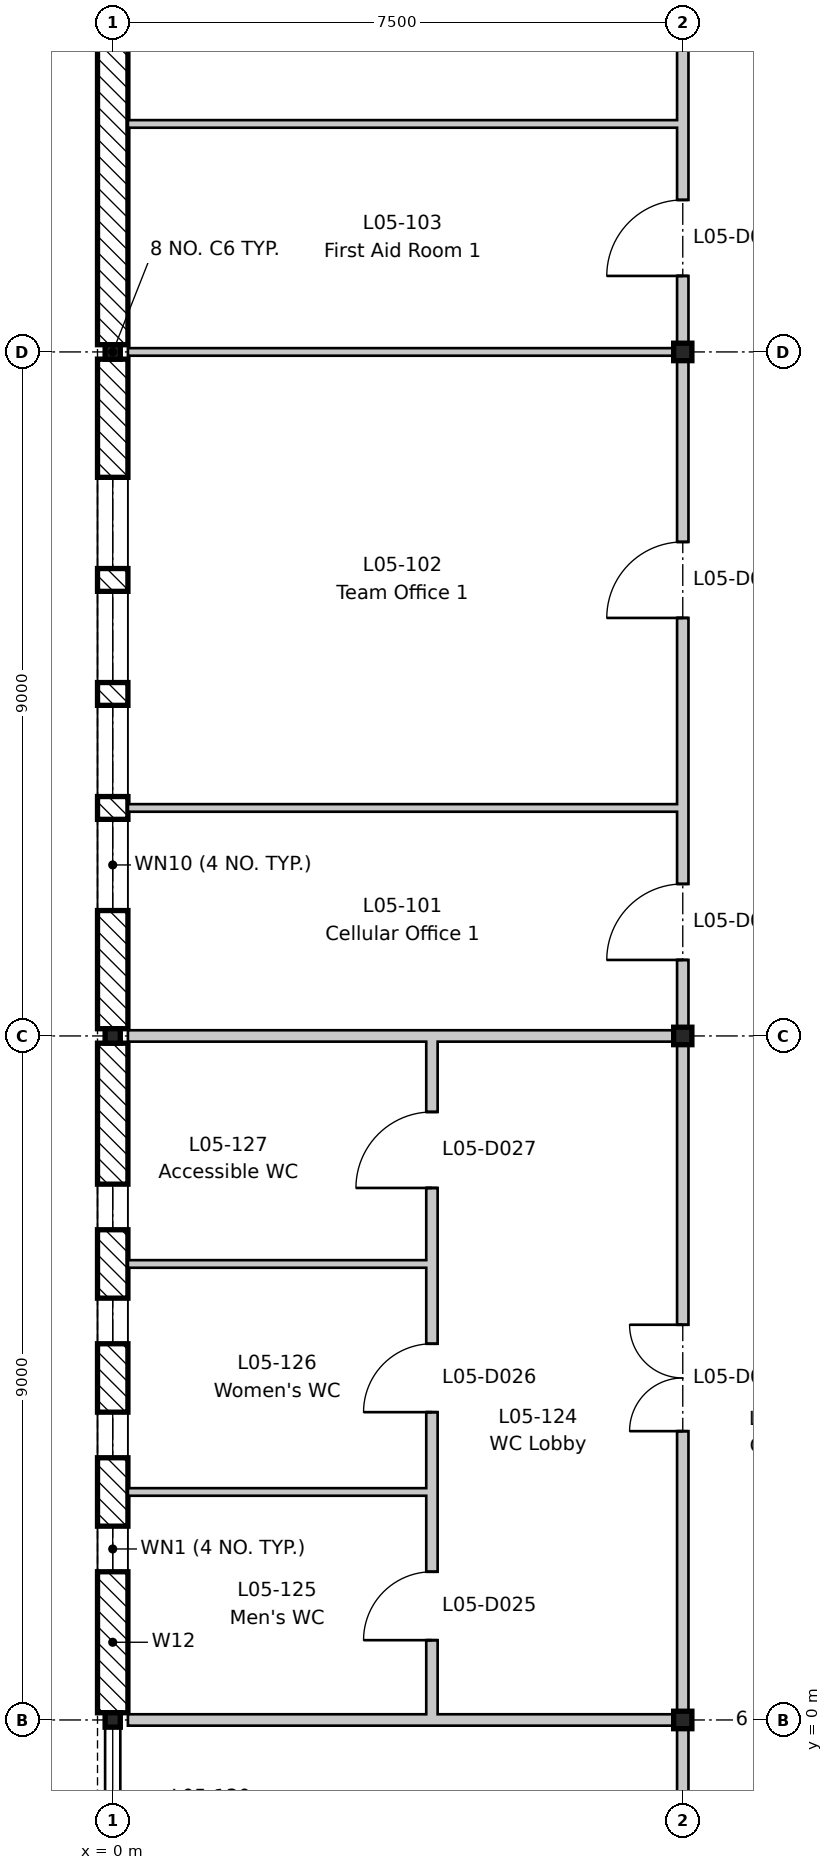
"""IFC4 building model, lengths in metres.
Left out: names, types, materials, properties, quantities, classifications, styles, units other than length and angle.
Written with IfcOpenShell. Run it as: python <this file> out.ifc"""

import sys

from ifc_helpers import new_model, si_unit, direction, frame, frame_2d, origin, origin_2d, place, context, subcontext, project, spatial, rectangle, i_section, extrude, element, fill, save


model = new_model("IFC4")
c1 = context("Model", 3, precision=1e-05, world=origin(), true_north=direction((0.0, 1.0)))
c2 = subcontext(c1, "Body", "Model", "MODEL_VIEW")
j1 = project(units=[si_unit("LENGTHUNIT", "METRE"), si_unit("PLANEANGLEUNIT", "RADIAN")], contexts=[c1])
p1 = place(None, origin())
s1 = spatial("IfcSite", under=j1, at=p1, CompositionType="ELEMENT")
p2 = place(p1, origin())
s2 = spatial("IfcBuilding", under=s1, at=p2, CompositionType="ELEMENT")
p3 = place(p2, frame((0.0, 0.0, 22.8)))
s3 = spatial("IfcBuildingStorey", under=s2, at=p3, CompositionType="ELEMENT", Elevation=22.8)
for number, where, z_axis, x_axis in (
    (1, (0.0, 0.0, -0.2), (0.0, 0.0, 1.0), (1.0, 0.0, 0.0)),
    (2, (0.0, 9.0, -0.2), (0.0, 0.0, 1.0), (1.0, 0.0, 0.0)),
    (3, (0.0, 18.0, -0.2), (0.0, 0.0, 1.0), (1.0, 0.0, 0.0)),
):
    element("IfcColumn", number, at=place(p3, frame(where, z_axis=z_axis, x_axis=x_axis)), inside=s3, PredefinedType="COLUMN", context=c2, shape_type="SweptSolid", body=[
        extrude(i_section(OverallWidth=0.2, OverallDepth=0.19, WebThickness=0.007, FlangeThickness=0.01, FilletRadius=0.018, at=origin_2d()), origin(), (0.0, 0.0, 1.0), 4.15),
    ])
for number, where, z_axis, x_axis in (
    (4, (7.5, 0.0, -0.2), (0.0, 0.0, 1.0), (1.0, 0.0, 0.0)),
    (5, (7.5, 9.0, -0.2), (0.0, 0.0, 1.0), (1.0, 0.0, 0.0)),
    (6, (7.5, 18.0, -0.2), (0.0, 0.0, 1.0), (1.0, 0.0, 0.0)),
):
    element("IfcColumn", number, at=place(p3, frame(where, z_axis=z_axis, x_axis=x_axis)), inside=s3, PredefinedType="COLUMN", context=c2, shape_type="SweptSolid", body=[
        extrude(i_section(OverallWidth=0.24, OverallDepth=0.23, WebThickness=0.008, FlangeThickness=0.012, FilletRadius=0.021, at=origin_2d()), origin(), (0.0, 0.0, 1.0), 4.15),
    ])
p4 = place(p3, frame((0.0, 0.095, 0.0), z_axis=(0.0, 0.0, 1.0), x_axis=(0.0, 1.0, 0.0)))
e7 = element("IfcWall", 7, at=p4, inside=s3, PredefinedType="STANDARD", context=c2, shape_type="SweptSolid", body=[
    extrude(rectangle(XDim=8.81, YDim=0.4, at=frame_2d((4.405, 0.0))), origin(), (0.0, 0.0, 1.0), 3.55),
])
p5 = place(p4, frame((1.855, 0.0, 1.5)))
e8 = element("IfcOpeningElement", 8, at=p5, cuts=e7, PredefinedType="OPENING", context=c2, shape_type="SweptSolid", body=[
    extrude(rectangle(XDim=0.6, YDim=1.2, at=frame_2d((0.3, 0.6))), frame((0.0, 0.21, 0.0), z_axis=(0.0, -1.0, 0.0), x_axis=(1.0, 0.0, 0.0)), (0.0, 0.0, 1.0), 0.42),
])
p6 = place(p4, frame((3.355, 0.0, 1.5)))
e9 = element("IfcOpeningElement", 9, at=p6, cuts=e7, PredefinedType="OPENING", context=c2, shape_type="SweptSolid", body=[
    extrude(rectangle(XDim=0.6, YDim=1.2, at=frame_2d((0.3, 0.6))), frame((0.0, 0.21, 0.0), z_axis=(0.0, -1.0, 0.0), x_axis=(1.0, 0.0, 0.0)), (0.0, 0.0, 1.0), 0.42),
])
p7 = place(p4, frame((4.855, 0.0, 1.5)))
e10 = element("IfcOpeningElement", 10, at=p7, cuts=e7, PredefinedType="OPENING", context=c2, shape_type="SweptSolid", body=[
    extrude(rectangle(XDim=0.6, YDim=1.2, at=frame_2d((0.3, 0.6))), frame((0.0, 0.21, 0.0), z_axis=(0.0, -1.0, 0.0), x_axis=(1.0, 0.0, 0.0)), (0.0, 0.0, 1.0), 0.42),
])
p8 = place(p4, frame((6.355, 0.0, 1.5)))
e11 = element("IfcOpeningElement", 11, at=p8, cuts=e7, PredefinedType="OPENING", context=c2, shape_type="SweptSolid", body=[
    extrude(rectangle(XDim=0.6, YDim=1.2, at=frame_2d((0.3, 0.6))), frame((0.0, 0.21, 0.0), z_axis=(0.0, -1.0, 0.0), x_axis=(1.0, 0.0, 0.0)), (0.0, 0.0, 1.0), 0.42),
])
p9 = place(p3, frame((0.0, 9.095, 0.0), z_axis=(0.0, 0.0, 1.0), x_axis=(0.0, 1.0, 0.0)))
e12 = element("IfcWall", 12, at=p9, inside=s3, PredefinedType="STANDARD", context=c2, shape_type="SweptSolid", body=[
    extrude(rectangle(XDim=8.81, YDim=0.4, at=frame_2d((4.405, 0.0))), origin(), (0.0, 0.0, 1.0), 3.55),
])
p10 = place(p9, frame((1.555, 0.0, 0.6)))
e13 = element("IfcOpeningElement", 13, at=p10, cuts=e12, PredefinedType="OPENING", context=c2, shape_type="SweptSolid", body=[
    extrude(rectangle(XDim=1.2, YDim=1.8, at=frame_2d((0.6, 0.9))), frame((0.0, 0.21, 0.0), z_axis=(0.0, -1.0, 0.0), x_axis=(1.0, 0.0, 0.0)), (0.0, 0.0, 1.0), 0.42),
])
p11 = place(p9, frame((3.055, 0.0, 0.6)))
e14 = element("IfcOpeningElement", 14, at=p11, cuts=e12, PredefinedType="OPENING", context=c2, shape_type="SweptSolid", body=[
    extrude(rectangle(XDim=1.2, YDim=1.8, at=frame_2d((0.6, 0.9))), frame((0.0, 0.21, 0.0), z_axis=(0.0, -1.0, 0.0), x_axis=(1.0, 0.0, 0.0)), (0.0, 0.0, 1.0), 0.42),
])
p12 = place(p9, frame((4.555, 0.0, 0.6)))
e15 = element("IfcOpeningElement", 15, at=p12, cuts=e12, PredefinedType="OPENING", context=c2, shape_type="SweptSolid", body=[
    extrude(rectangle(XDim=1.2, YDim=1.8, at=frame_2d((0.6, 0.9))), frame((0.0, 0.21, 0.0), z_axis=(0.0, -1.0, 0.0), x_axis=(1.0, 0.0, 0.0)), (0.0, 0.0, 1.0), 0.42),
])
p13 = place(p9, frame((6.055, 0.0, 0.6)))
e16 = element("IfcOpeningElement", 16, at=p13, cuts=e12, PredefinedType="OPENING", context=c2, shape_type="SweptSolid", body=[
    extrude(rectangle(XDim=1.2, YDim=1.8, at=frame_2d((0.6, 0.9))), frame((0.0, 0.21, 0.0), z_axis=(0.0, -1.0, 0.0), x_axis=(1.0, 0.0, 0.0)), (0.0, 0.0, 1.0), 0.42),
])
p14 = place(p3, frame((0.0, 18.095, 0.0), z_axis=(0.0, 0.0, 1.0), x_axis=(0.0, 1.0, 0.0)))
e17 = element("IfcWall", 17, at=p14, inside=s3, PredefinedType="STANDARD", context=c2, shape_type="SweptSolid", body=[
    extrude(rectangle(XDim=8.81, YDim=0.4, at=frame_2d((4.405, 0.0))), origin(), (0.0, 0.0, 1.0), 3.55),
])
p15 = place(p3, frame((0.2, 9.0, 0.0), z_axis=(0.0, 0.0, 1.0), x_axis=(1.0, 0.0, 0.0)))
e18 = element("IfcWall", 18, at=p15, inside=s3, PredefinedType="PARTITIONING", context=c2, shape_type="SweptSolid", body=[
    extrude(rectangle(XDim=7.225, YDim=0.15, at=frame_2d((3.613, 0.0))), origin(), (0.0, 0.0, 1.0), 3.6),
])
p16 = place(p3, frame((0.2, 12.0, 0.0), z_axis=(0.0, 0.0, 1.0), x_axis=(1.0, 0.0, 0.0)))
e19 = element("IfcWall", 19, at=p16, inside=s3, PredefinedType="PARTITIONING", context=c2, shape_type="SweptSolid", body=[
    extrude(rectangle(XDim=7.225, YDim=0.1, at=frame_2d((3.613, 0.0))), origin(), (0.0, 0.0, 1.0), 3.95),
])
p17 = place(p3, frame((0.2, 18.0, 0.0), z_axis=(0.0, 0.0, 1.0), x_axis=(1.0, 0.0, 0.0)))
e20 = element("IfcWall", 20, at=p17, inside=s3, PredefinedType="PARTITIONING", context=c2, shape_type="SweptSolid", body=[
    extrude(rectangle(XDim=7.225, YDim=0.1, at=frame_2d((3.613, 0.0))), origin(), (0.0, 0.0, 1.0), 3.6),
])
p18 = place(p3, frame((0.2, 21.0, 0.0), z_axis=(0.0, 0.0, 1.0), x_axis=(1.0, 0.0, 0.0)))
e21 = element("IfcWall", 21, at=p18, inside=s3, PredefinedType="PARTITIONING", context=c2, shape_type="SweptSolid", body=[
    extrude(rectangle(XDim=7.225, YDim=0.1, at=frame_2d((3.613, 0.0))), origin(), (0.0, 0.0, 1.0), 3.95),
])
p19 = place(p3, frame((0.2, 0.0, 0.0), z_axis=(0.0, 0.0, 1.0), x_axis=(1.0, 0.0, 0.0)))
e22 = element("IfcWall", 22, at=p19, inside=s3, PredefinedType="PARTITIONING", context=c2, shape_type="SweptSolid", body=[
    extrude(rectangle(XDim=7.225, YDim=0.15, at=frame_2d((3.613, 0.0))), origin(), (0.0, 0.0, 1.0), 3.6),
])
p20 = place(p3, frame((7.5, -8.8, 0.0), z_axis=(0.0, 0.0, 1.0), x_axis=(0.0, 1.0, 0.0)))
e23 = element("IfcWall", 23, at=p20, inside=s3, PredefinedType="PARTITIONING", context=c2, shape_type="SweptSolid", body=[
    extrude(rectangle(XDim=79.3, YDim=0.15, at=frame_2d((39.65, 0.0))), origin(), (0.0, 0.0, 1.0), 3.43),
])
p21 = place(p20, frame((18.8, 0.0, 0.0)))
e24 = element("IfcOpeningElement", 24, at=p21, cuts=e23, PredefinedType="OPENING", context=c2, shape_type="SweptSolid", body=[
    extrude(rectangle(XDim=1.0, YDim=2.1, at=frame_2d((0.5, 1.05))), frame((0.0, 0.085, 0.0), z_axis=(0.0, -1.0, 0.0), x_axis=(1.0, 0.0, 0.0)), (0.0, 0.0, 1.0), 0.17),
])
p22 = place(p20, frame((23.3, 0.0, 0.0)))
e25 = element("IfcOpeningElement", 25, at=p22, cuts=e23, PredefinedType="OPENING", context=c2, shape_type="SweptSolid", body=[
    extrude(rectangle(XDim=1.0, YDim=2.1, at=frame_2d((0.5, 1.05))), frame((0.0, 0.085, 0.0), z_axis=(0.0, -1.0, 0.0), x_axis=(1.0, 0.0, 0.0)), (0.0, 0.0, 1.0), 0.17),
])
p23 = place(p20, frame((27.8, 0.0, 0.0)))
e26 = element("IfcOpeningElement", 26, at=p23, cuts=e23, PredefinedType="OPENING", context=c2, shape_type="SweptSolid", body=[
    extrude(rectangle(XDim=1.0, YDim=2.1, at=frame_2d((0.5, 1.05))), frame((0.0, 0.085, 0.0), z_axis=(0.0, -1.0, 0.0), x_axis=(1.0, 0.0, 0.0)), (0.0, 0.0, 1.0), 0.17),
])
p24 = place(p20, frame((32.3, 0.0, 0.0)))
e27 = element("IfcOpeningElement", 27, at=p24, cuts=e23, PredefinedType="OPENING", context=c2, shape_type="SweptSolid", body=[
    extrude(rectangle(XDim=1.0, YDim=2.1, at=frame_2d((0.5, 1.05))), frame((0.0, 0.085, 0.0), z_axis=(0.0, -1.0, 0.0), x_axis=(1.0, 0.0, 0.0)), (0.0, 0.0, 1.0), 0.17),
])
p25 = place(p20, frame((45.8, 0.0, 0.0)))
e28 = element("IfcOpeningElement", 28, at=p25, cuts=e23, PredefinedType="OPENING", context=c2, shape_type="SweptSolid", body=[
    extrude(rectangle(XDim=1.0, YDim=2.1, at=frame_2d((0.5, 1.05))), frame((0.0, 0.085, 0.0), z_axis=(0.0, -1.0, 0.0), x_axis=(1.0, 0.0, 0.0)), (0.0, 0.0, 1.0), 0.17),
])
p26 = place(p20, frame((48.8, 0.0, 0.0)))
e29 = element("IfcOpeningElement", 29, at=p26, cuts=e23, PredefinedType="OPENING", context=c2, shape_type="SweptSolid", body=[
    extrude(rectangle(XDim=1.0, YDim=2.1, at=frame_2d((0.5, 1.05))), frame((0.0, 0.085, 0.0), z_axis=(0.0, -1.0, 0.0), x_axis=(1.0, 0.0, 0.0)), (0.0, 0.0, 1.0), 0.17),
])
p27 = place(p20, frame((54.55, 0.0, 0.0)))
e30 = element("IfcOpeningElement", 30, at=p27, cuts=e23, PredefinedType="OPENING", context=c2, shape_type="SweptSolid", body=[
    extrude(rectangle(XDim=1.0, YDim=2.1, at=frame_2d((0.5, 1.05))), frame((0.0, 0.085, 0.0), z_axis=(0.0, -1.0, 0.0), x_axis=(1.0, 0.0, 0.0)), (0.0, 0.0, 1.0), 0.17),
])
p28 = place(p20, frame((57.8, 0.0, 0.0)))
e31 = element("IfcOpeningElement", 31, at=p28, cuts=e23, PredefinedType="OPENING", context=c2, shape_type="SweptSolid", body=[
    extrude(rectangle(XDim=1.0, YDim=2.1, at=frame_2d((0.5, 1.05))), frame((0.0, 0.085, 0.0), z_axis=(0.0, -1.0, 0.0), x_axis=(1.0, 0.0, 0.0)), (0.0, 0.0, 1.0), 0.17),
])
p29 = place(p20, frame((60.8, 0.0, 0.0)))
e32 = element("IfcOpeningElement", 32, at=p29, cuts=e23, PredefinedType="OPENING", context=c2, shape_type="SweptSolid", body=[
    extrude(rectangle(XDim=1.0, YDim=2.1, at=frame_2d((0.5, 1.05))), frame((0.0, 0.085, 0.0), z_axis=(0.0, -1.0, 0.0), x_axis=(1.0, 0.0, 0.0)), (0.0, 0.0, 1.0), 0.17),
])
p30 = place(p20, frame((12.6, 0.0, 0.0)))
e33 = element("IfcOpeningElement", 33, at=p30, cuts=e23, PredefinedType="OPENING", context=c2, shape_type="SweptSolid", body=[
    extrude(rectangle(XDim=1.4, YDim=2.1, at=frame_2d((0.7, 1.05))), frame((0.0, 0.085, 0.0), z_axis=(0.0, -1.0, 0.0), x_axis=(1.0, 0.0, 0.0)), (0.0, 0.0, 1.0), 0.17),
])
p31 = place(p20, frame((3.6, 0.0, 0.0)))
e34 = element("IfcOpeningElement", 34, at=p31, cuts=e23, PredefinedType="OPENING", context=c2, shape_type="SweptSolid", body=[
    extrude(rectangle(XDim=1.4, YDim=2.1, at=frame_2d((0.7, 1.05))), frame((0.0, 0.085, 0.0), z_axis=(0.0, -1.0, 0.0), x_axis=(1.0, 0.0, 0.0)), (0.0, 0.0, 1.0), 0.17),
])
p32 = place(p20, frame((63.55, 0.0, 0.0)))
e35 = element("IfcOpeningElement", 35, at=p32, cuts=e23, PredefinedType="OPENING", context=c2, shape_type="SweptSolid", body=[
    extrude(rectangle(XDim=1.4, YDim=2.1, at=frame_2d((0.7, 1.05))), frame((0.0, 0.085, 0.0), z_axis=(0.0, -1.0, 0.0), x_axis=(1.0, 0.0, 0.0)), (0.0, 0.0, 1.0), 0.17),
])
p33 = place(p20, frame((69.6, 0.0, 0.0)))
e36 = element("IfcOpeningElement", 36, at=p33, cuts=e23, PredefinedType="OPENING", context=c2, shape_type="SweptSolid", body=[
    extrude(rectangle(XDim=1.4, YDim=2.1, at=frame_2d((0.7, 1.05))), frame((0.0, 0.085, 0.0), z_axis=(0.0, -1.0, 0.0), x_axis=(1.0, 0.0, 0.0)), (0.0, 0.0, 1.0), 0.17),
])
p34 = place(p20, frame((42.85, 0.0, 0.0)))
e37 = element("IfcOpeningElement", 37, at=p34, cuts=e23, PredefinedType="OPENING", context=c2, shape_type="SweptSolid", body=[
    extrude(rectangle(XDim=1.0, YDim=2.1, at=frame_2d((0.5, 1.05))), frame((0.0, 0.085, 0.0), z_axis=(0.0, -1.0, 0.0), x_axis=(1.0, 0.0, 0.0)), (0.0, 0.0, 1.0), 0.17),
])
p35 = place(p20, frame((36.55, 0.0, 0.0)))
e38 = element("IfcOpeningElement", 38, at=p35, cuts=e23, PredefinedType="OPENING", context=c2, shape_type="SweptSolid", body=[
    extrude(rectangle(XDim=1.4, YDim=2.1, at=frame_2d((0.7, 1.05))), frame((0.0, 0.085, 0.0), z_axis=(0.0, -1.0, 0.0), x_axis=(1.0, 0.0, 0.0)), (0.0, 0.0, 1.0), 0.17),
])
p36 = place(p20, frame((72.8, 0.0, 0.0)))
e39 = element("IfcOpeningElement", 39, at=p36, cuts=e23, PredefinedType="OPENING", context=c2, shape_type="SweptSolid", body=[
    extrude(rectangle(XDim=1.0, YDim=2.1, at=frame_2d((0.5, 1.05))), frame((0.0, 0.085, 0.0), z_axis=(0.0, -1.0, 0.0), x_axis=(1.0, 0.0, 0.0)), (0.0, 0.0, 1.0), 0.17),
])
p37 = place(p3, frame((4.2, 0.075, 0.0), z_axis=(0.0, 0.0, 1.0), x_axis=(0.0, 1.0, 0.0)))
e40 = element("IfcWall", 40, at=p37, inside=s3, PredefinedType="PARTITIONING", context=c2, shape_type="SweptSolid", body=[
    extrude(rectangle(XDim=8.85, YDim=0.15, at=frame_2d((4.425, 0.0))), origin(), (0.0, 0.0, 1.0), 3.95),
])
p38 = place(p37, frame((0.975, 0.0, 0.0)))
e41 = element("IfcOpeningElement", 41, at=p38, cuts=e40, PredefinedType="OPENING", context=c2, shape_type="SweptSolid", body=[
    extrude(rectangle(XDim=0.9, YDim=2.1, at=frame_2d((0.45, 1.05))), frame((0.0, 0.085, 0.0), z_axis=(0.0, -1.0, 0.0), x_axis=(1.0, 0.0, 0.0)), (0.0, 0.0, 1.0), 0.17),
])
p39 = place(p37, frame((3.975, 0.0, 0.0)))
e42 = element("IfcOpeningElement", 42, at=p39, cuts=e40, PredefinedType="OPENING", context=c2, shape_type="SweptSolid", body=[
    extrude(rectangle(XDim=0.9, YDim=2.1, at=frame_2d((0.45, 1.05))), frame((0.0, 0.085, 0.0), z_axis=(0.0, -1.0, 0.0), x_axis=(1.0, 0.0, 0.0)), (0.0, 0.0, 1.0), 0.17),
])
p40 = place(p37, frame((6.925, 0.0, 0.0)))
e43 = element("IfcOpeningElement", 43, at=p40, cuts=e40, PredefinedType="OPENING", context=c2, shape_type="SweptSolid", body=[
    extrude(rectangle(XDim=1.0, YDim=2.1, at=frame_2d((0.5, 1.05))), frame((0.0, 0.085, 0.0), z_axis=(0.0, -1.0, 0.0), x_axis=(1.0, 0.0, 0.0)), (0.0, 0.0, 1.0), 0.17),
])
for number, where, z_axis, x_axis in (
    (44, (0.2, 3.0, 0.0), (0.0, 0.0, 1.0), (1.0, 0.0, 0.0)),
    (45, (0.2, 6.0, 0.0), (0.0, 0.0, 1.0), (1.0, 0.0, 0.0)),
):
    element("IfcWall", number, at=place(p3, frame(where, z_axis=z_axis, x_axis=x_axis)), inside=s3, PredefinedType="PARTITIONING", context=c2, shape_type="SweptSolid", body=[
        extrude(rectangle(XDim=3.925, YDim=0.1, at=frame_2d((1.962, 0.0))), origin(), (0.0, 0.0, 1.0), 3.95),
    ])
p41 = place(p5, origin())
e46 = element("IfcWindow", 46, at=p41, inside=s3, PartitioningType="SINGLE_PANEL", PredefinedType="WINDOW", context=c2, shape_type="SweptSolid", body=[
    extrude(rectangle(XDim=0.6, YDim=1.2, at=frame_2d((0.3, 0.6))), frame((0.0, 0.03, 0.0), z_axis=(0.0, -1.0, 0.0), x_axis=(1.0, 0.0, 0.0)), (0.0, 0.0, 1.0), 0.06),
])
fill(e8, e46)
p42 = place(p6, origin())
e47 = element("IfcWindow", 47, at=p42, inside=s3, PartitioningType="SINGLE_PANEL", PredefinedType="WINDOW", context=c2, shape_type="SweptSolid", body=[
    extrude(rectangle(XDim=0.6, YDim=1.2, at=frame_2d((0.3, 0.6))), frame((0.0, 0.03, 0.0), z_axis=(0.0, -1.0, 0.0), x_axis=(1.0, 0.0, 0.0)), (0.0, 0.0, 1.0), 0.06),
])
fill(e9, e47)
p43 = place(p7, origin())
e48 = element("IfcWindow", 48, at=p43, inside=s3, PartitioningType="SINGLE_PANEL", PredefinedType="WINDOW", context=c2, shape_type="SweptSolid", body=[
    extrude(rectangle(XDim=0.6, YDim=1.2, at=frame_2d((0.3, 0.6))), frame((0.0, 0.03, 0.0), z_axis=(0.0, -1.0, 0.0), x_axis=(1.0, 0.0, 0.0)), (0.0, 0.0, 1.0), 0.06),
])
fill(e10, e48)
p44 = place(p8, origin())
e49 = element("IfcWindow", 49, at=p44, inside=s3, PartitioningType="SINGLE_PANEL", PredefinedType="WINDOW", context=c2, shape_type="SweptSolid", body=[
    extrude(rectangle(XDim=0.6, YDim=1.2, at=frame_2d((0.3, 0.6))), frame((0.0, 0.03, 0.0), z_axis=(0.0, -1.0, 0.0), x_axis=(1.0, 0.0, 0.0)), (0.0, 0.0, 1.0), 0.06),
])
fill(e11, e49)
p45 = place(p10, origin())
e50 = element("IfcWindow", 50, at=p45, inside=s3, PartitioningType="SINGLE_PANEL", PredefinedType="WINDOW", context=c2, shape_type="SweptSolid", body=[
    extrude(rectangle(XDim=1.2, YDim=1.8, at=frame_2d((0.6, 0.9))), frame((0.0, 0.03, 0.0), z_axis=(0.0, -1.0, 0.0), x_axis=(1.0, 0.0, 0.0)), (0.0, 0.0, 1.0), 0.06),
])
fill(e13, e50)
p46 = place(p11, origin())
e51 = element("IfcWindow", 51, at=p46, inside=s3, PartitioningType="SINGLE_PANEL", PredefinedType="WINDOW", context=c2, shape_type="SweptSolid", body=[
    extrude(rectangle(XDim=1.2, YDim=1.8, at=frame_2d((0.6, 0.9))), frame((0.0, 0.03, 0.0), z_axis=(0.0, -1.0, 0.0), x_axis=(1.0, 0.0, 0.0)), (0.0, 0.0, 1.0), 0.06),
])
fill(e14, e51)
p47 = place(p12, origin())
e52 = element("IfcWindow", 52, at=p47, inside=s3, PartitioningType="SINGLE_PANEL", PredefinedType="WINDOW", context=c2, shape_type="SweptSolid", body=[
    extrude(rectangle(XDim=1.2, YDim=1.8, at=frame_2d((0.6, 0.9))), frame((0.0, 0.03, 0.0), z_axis=(0.0, -1.0, 0.0), x_axis=(1.0, 0.0, 0.0)), (0.0, 0.0, 1.0), 0.06),
])
fill(e15, e52)
p48 = place(p13, origin())
e53 = element("IfcWindow", 53, at=p48, inside=s3, PartitioningType="SINGLE_PANEL", PredefinedType="WINDOW", context=c2, shape_type="SweptSolid", body=[
    extrude(rectangle(XDim=1.2, YDim=1.8, at=frame_2d((0.6, 0.9))), frame((0.0, 0.03, 0.0), z_axis=(0.0, -1.0, 0.0), x_axis=(1.0, 0.0, 0.0)), (0.0, 0.0, 1.0), 0.06),
])
fill(e16, e53)
p49 = place(p21, origin())
e54 = element("IfcDoor", 54, at=p49, inside=s3, OperationType="SINGLE_SWING_LEFT", PredefinedType="DOOR", context=c2, shape_type="SweptSolid", body=[
    extrude(rectangle(XDim=1.0, YDim=2.1, at=frame_2d((0.5, 1.05))), frame((0.0, 0.025, 0.0), z_axis=(0.0, -1.0, 0.0), x_axis=(1.0, 0.0, 0.0)), (0.0, 0.0, 1.0), 0.05),
])
fill(e24, e54)
p50 = place(p22, origin())
e55 = element("IfcDoor", 55, at=p50, inside=s3, OperationType="SINGLE_SWING_LEFT", PredefinedType="DOOR", context=c2, shape_type="SweptSolid", body=[
    extrude(rectangle(XDim=1.0, YDim=2.1, at=frame_2d((0.5, 1.05))), frame((0.0, 0.025, 0.0), z_axis=(0.0, -1.0, 0.0), x_axis=(1.0, 0.0, 0.0)), (0.0, 0.0, 1.0), 0.05),
])
fill(e25, e55)
p51 = place(p23, origin())
e56 = element("IfcDoor", 56, at=p51, inside=s3, OperationType="SINGLE_SWING_LEFT", PredefinedType="DOOR", context=c2, shape_type="SweptSolid", body=[
    extrude(rectangle(XDim=1.0, YDim=2.1, at=frame_2d((0.5, 1.05))), frame((0.0, 0.025, 0.0), z_axis=(0.0, -1.0, 0.0), x_axis=(1.0, 0.0, 0.0)), (0.0, 0.0, 1.0), 0.05),
])
fill(e26, e56)
p52 = place(p30, origin())
e57 = element("IfcDoor", 57, at=p52, inside=s3, OperationType="DOUBLE_DOOR_SINGLE_SWING", PredefinedType="DOOR", context=c2, shape_type="SweptSolid", body=[
    extrude(rectangle(XDim=1.4, YDim=2.1, at=frame_2d((0.7, 1.05))), frame((0.0, 0.025, 0.0), z_axis=(0.0, -1.0, 0.0), x_axis=(1.0, 0.0, 0.0)), (0.0, 0.0, 1.0), 0.05),
])
fill(e33, e57)
p53 = place(p38, origin())
e58 = element("IfcDoor", 58, at=p53, inside=s3, OperationType="SINGLE_SWING_LEFT", PredefinedType="DOOR", context=c2, shape_type="SweptSolid", body=[
    extrude(rectangle(XDim=0.9, YDim=2.1, at=frame_2d((0.45, 1.05))), frame((0.0, 0.025, 0.0), z_axis=(0.0, -1.0, 0.0), x_axis=(1.0, 0.0, 0.0)), (0.0, 0.0, 1.0), 0.05),
])
fill(e41, e58)
p54 = place(p39, origin())
e59 = element("IfcDoor", 59, at=p54, inside=s3, OperationType="SINGLE_SWING_LEFT", PredefinedType="DOOR", context=c2, shape_type="SweptSolid", body=[
    extrude(rectangle(XDim=0.9, YDim=2.1, at=frame_2d((0.45, 1.05))), frame((0.0, 0.025, 0.0), z_axis=(0.0, -1.0, 0.0), x_axis=(1.0, 0.0, 0.0)), (0.0, 0.0, 1.0), 0.05),
])
fill(e42, e59)
p55 = place(p40, origin())
e60 = element("IfcDoor", 60, at=p55, inside=s3, OperationType="SINGLE_SWING_LEFT", PredefinedType="DOOR", context=c2, shape_type="SweptSolid", body=[
    extrude(rectangle(XDim=1.0, YDim=2.1, at=frame_2d((0.5, 1.05))), frame((0.0, 0.025, 0.0), z_axis=(0.0, -1.0, 0.0), x_axis=(1.0, 0.0, 0.0)), (0.0, 0.0, 1.0), 0.05),
])
fill(e43, e60)
save(model, sys.argv[1])
